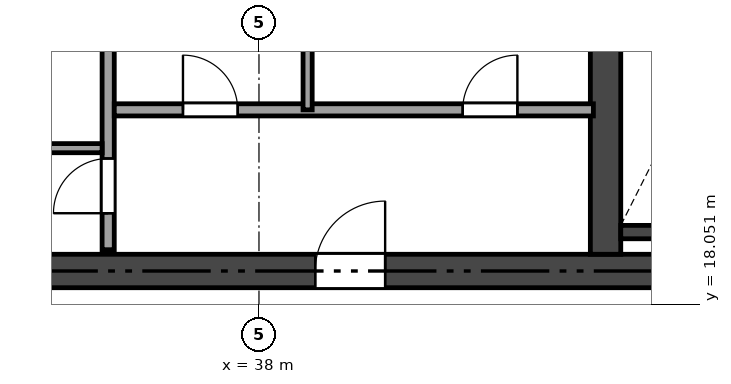
"""IFC4 building model, lengths in metres.
Left out: names, types, materials, properties, quantities, classifications, styles, units other than length and angle.
Written with IfcOpenShell. Run it as: python <this file> out.ifc"""

import sys

from ifc_helpers import new_model, si_unit, direction, frame, frame_2d, origin, place, context, subcontext, project, spatial, rectangle, extrude, element, fill, save


model = new_model("IFC4")
c1 = context("Model", 3, precision=1e-05, world=origin(), true_north=direction((0.0, 1.0)))
c2 = subcontext(c1, "Body", "Model", "MODEL_VIEW")
j1 = project(units=[si_unit("LENGTHUNIT", "METRE"), si_unit("PLANEANGLEUNIT", "RADIAN")], contexts=[c1])
p1 = place(None, origin())
s1 = spatial("IfcSite", under=j1, at=p1, CompositionType="ELEMENT")
p2 = place(p1, origin())
s2 = spatial("IfcBuilding", under=s1, at=p2, CompositionType="ELEMENT")
p3 = place(p2, frame((0.0, 0.0, 289.9)))
s3 = spatial("IfcBuildingStorey", under=s2, at=p3, CompositionType="ELEMENT", Elevation=289.9)
p4 = place(p3, frame((26.525, 18.6, 0.0), z_axis=(0.0, 0.0, 1.0), x_axis=(1.0, 0.0, 0.0)))
e1 = element("IfcWall", 1, at=p4, inside=s3, PredefinedType="SHEAR", context=c2, shape_type="SweptSolid", body=[
    extrude(rectangle(XDim=21.35, YDim=0.55, at=frame_2d((10.675, 0.0))), origin(), (0.0, 0.0, 1.0), 2.58),
])
p5 = place(p4, frame((12.4, 0.0, 0.0)))
e2 = element("IfcOpeningElement", 2, at=p5, cuts=e1, PredefinedType="OPENING", context=c2, shape_type="SweptSolid", body=[
    extrude(rectangle(XDim=1.15, YDim=2.15, at=frame_2d((0.575, 1.075))), frame((0.0, 0.285, 0.0), z_axis=(0.0, -1.0, 0.0), x_axis=(1.0, 0.0, 0.0)), (0.0, 0.0, 1.0), 0.57),
])
p6 = place(p4, frame((5.225, 0.0, 0.0)))
e3 = element("IfcOpeningElement", 3, at=p6, cuts=e1, PredefinedType="OPENING", context=c2, shape_type="SweptSolid", body=[
    extrude(rectangle(XDim=0.9, YDim=2.1, at=frame_2d((0.45, 1.05))), frame((0.0, 0.285, 0.0), z_axis=(0.0, -1.0, 0.0), x_axis=(1.0, 0.0, 0.0)), (0.0, 0.0, 1.0), 0.57),
])
p7 = place(p3, frame((43.7, 18.875, 0.0), z_axis=(0.0, 0.0, 1.0), x_axis=(0.0, 1.0, 0.0)))
e4 = element("IfcWall", 4, at=p7, inside=s3, PredefinedType="SHEAR", context=c2, shape_type="SweptSolid", body=[
    extrude(rectangle(XDim=15.05, YDim=0.5, at=frame_2d((7.525, 0.0))), origin(), (0.0, 0.0, 1.0), 2.58),
])
p8 = place(p7, frame((8.125, 0.0, 0.0)))
e5 = element("IfcOpeningElement", 5, at=p8, cuts=e4, PredefinedType="OPENING", context=c2, shape_type="SweptSolid", body=[
    extrude(rectangle(XDim=0.9, YDim=2.1, at=frame_2d((0.45, 1.05))), frame((0.0, 0.26, 0.0), z_axis=(0.0, -1.0, 0.0), x_axis=(1.0, 0.0, 0.0)), (0.0, 0.0, 1.0), 0.52),
])
p9 = place(p3, frame((43.95, 19.24, 0.0), z_axis=(0.0, 0.0, 1.0), x_axis=(1.0, 0.0, 0.0)))
e6 = element("IfcWall", 6, at=p9, inside=s3, PredefinedType="SHEAR", context=c2, shape_type="SweptSolid", body=[
    extrude(rectangle(XDim=3.375, YDim=0.22, at=frame_2d((1.688, 0.0))), origin(), (0.0, 0.0, 1.0), 2.58),
])
p10 = place(p3, frame((42.435, 42.747, 0.0), z_axis=(0.0, 0.0, 1.0), x_axis=(0.485411824616, -0.874285628684, 0.0)))
e7 = element("IfcWall", 7, at=p10, inside=s3, PredefinedType="PARAPET", context=c2, shape_type="SweptSolid", body=[
    extrude(rectangle(XDim=23.502, YDim=0.18, at=frame_2d((11.751, 0.0))), origin(), (0.0, 0.0, 1.0), 1.15),
])
p11 = place(p3, frame((35.52, 18.95, 0.0), z_axis=(0.0, 0.0, 1.0), x_axis=(0.0, 1.0, 0.0)))
e8 = element("IfcWall", 8, at=p11, inside=s3, PredefinedType="SOLIDWALL", context=c2, shape_type="SweptSolid", body=[
    extrude(rectangle(XDim=14.9, YDim=0.2, at=frame_2d((7.45, 0.0))), origin(), (0.0, 0.0, 1.0), 2.27),
])
p12 = place(p11, frame((7.755, 0.0, 0.0)))
e9 = element("IfcOpeningElement", 9, at=p12, cuts=e8, PredefinedType="OPENING", context=c2, shape_type="SweptSolid", body=[
    extrude(rectangle(XDim=0.95, YDim=2.15, at=frame_2d((0.475, 1.075))), frame((0.0, 0.11, 0.0), z_axis=(0.0, -1.0, 0.0), x_axis=(1.0, 0.0, 0.0)), (0.0, 0.0, 1.0), 0.22),
])
p13 = place(p11, frame((0.6, 0.0, 0.0)))
e10 = element("IfcOpeningElement", 10, at=p13, cuts=e8, PredefinedType="OPENING", context=c2, shape_type="SweptSolid", body=[
    extrude(rectangle(XDim=0.9, YDim=2.1, at=frame_2d((0.45, 1.05))), frame((0.0, 0.11, 0.0), z_axis=(0.0, -1.0, 0.0), x_axis=(1.0, 0.0, 0.0)), (0.0, 0.0, 1.0), 0.22),
])
p14 = place(p3, frame((33.42, 20.62, 0.0), z_axis=(0.0, 0.0, 1.0), x_axis=(1.0, 0.0, 0.0)))
e11 = element("IfcWall", 11, at=p14, inside=s3, PredefinedType="PARTITIONING", context=c2, shape_type="SweptSolid", body=[
    extrude(rectangle(XDim=2.0, YDim=0.15, at=frame_2d((1.0, 0.0))), origin(), (0.0, 0.0, 1.0), 2.58),
])
p15 = place(p3, frame((35.62, 21.25, 0.0), z_axis=(0.0, 0.0, 1.0), x_axis=(1.0, 0.0, 0.0)))
e12 = element("IfcWall", 12, at=p15, inside=s3, PredefinedType="SOLIDWALL", context=c2, shape_type="SweptSolid", body=[
    extrude(rectangle(XDim=7.88, YDim=0.2, at=frame_2d((3.94, 0.0))), origin(), (0.0, 0.0, 1.0), 2.58),
])
p16 = place(p15, frame((1.13, 0.0, 0.0)))
e13 = element("IfcOpeningElement", 13, at=p16, cuts=e12, PredefinedType="OPENING", context=c2, shape_type="SweptSolid", body=[
    extrude(rectangle(XDim=0.9, YDim=2.1, at=frame_2d((0.45, 1.05))), frame((0.0, 0.11, 0.0), z_axis=(0.0, -1.0, 0.0), x_axis=(1.0, 0.0, 0.0)), (0.0, 0.0, 1.0), 0.22),
])
p17 = place(p15, frame((5.73, 0.0, 0.0)))
e14 = element("IfcOpeningElement", 14, at=p17, cuts=e12, PredefinedType="OPENING", context=c2, shape_type="SweptSolid", body=[
    extrude(rectangle(XDim=0.9, YDim=2.1, at=frame_2d((0.45, 1.05))), frame((0.0, 0.11, 0.0), z_axis=(0.0, -1.0, 0.0), x_axis=(1.0, 0.0, 0.0)), (0.0, 0.0, 1.0), 0.22),
])
p18 = place(p3, frame((38.8, 21.25, 0.0), z_axis=(0.0, 0.0, 1.0), x_axis=(0.0, 1.0, 0.0)))
e15 = element("IfcWall", 15, at=p18, inside=s3, PredefinedType="PARTITIONING", context=c2, shape_type="SweptSolid", body=[
    extrude(rectangle(XDim=2.4, YDim=0.15, at=frame_2d((1.2, 0.0))), origin(), (0.0, 0.0, 1.0), 2.101),
])
p19 = place(p5, origin())
e16 = element("IfcDoor", 16, at=p19, inside=s3, OperationType="SINGLE_SWING_RIGHT", PredefinedType="DOOR", context=c2, shape_type="SweptSolid", body=[
    extrude(rectangle(XDim=1.15, YDim=2.15, at=frame_2d((0.575, 1.075))), frame((0.0, 0.025, 0.0), z_axis=(0.0, -1.0, 0.0), x_axis=(1.0, 0.0, 0.0)), (0.0, 0.0, 1.0), 0.05),
])
fill(e2, e16)
p20 = place(p13, origin())
e17 = element("IfcDoor", 17, at=p20, inside=s3, OperationType="SINGLE_SWING_LEFT", PredefinedType="DOOR", context=c2, shape_type="SweptSolid", body=[
    extrude(rectangle(XDim=0.9, YDim=2.1, at=frame_2d((0.45, 1.05))), frame((0.0, 0.025, 0.0), z_axis=(0.0, -1.0, 0.0), x_axis=(1.0, 0.0, 0.0)), (0.0, 0.0, 1.0), 0.05),
])
fill(e10, e17)
p21 = place(p16, origin())
e18 = element("IfcDoor", 18, at=p21, inside=s3, OperationType="SINGLE_SWING_LEFT", PredefinedType="DOOR", context=c2, shape_type="SweptSolid", body=[
    extrude(rectangle(XDim=0.9, YDim=2.1, at=frame_2d((0.45, 1.05))), frame((0.0, 0.025, 0.0), z_axis=(0.0, -1.0, 0.0), x_axis=(1.0, 0.0, 0.0)), (0.0, 0.0, 1.0), 0.05),
])
fill(e13, e18)
p22 = place(p17, origin())
e19 = element("IfcDoor", 19, at=p22, inside=s3, OperationType="SINGLE_SWING_RIGHT", PredefinedType="DOOR", context=c2, shape_type="SweptSolid", body=[
    extrude(rectangle(XDim=0.9, YDim=2.1, at=frame_2d((0.45, 1.05))), frame((0.0, 0.025, 0.0), z_axis=(0.0, -1.0, 0.0), x_axis=(1.0, 0.0, 0.0)), (0.0, 0.0, 1.0), 0.05),
])
fill(e14, e19)
save(model, sys.argv[1])
